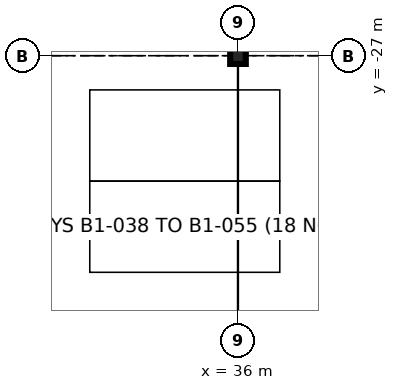
"""IFC4 building model, lengths in metres.
Left out: names, types, materials, properties, quantities, classifications, styles, units other than length and angle.
Written with IfcOpenShell. Run it as: python <this file> out.ifc"""

import sys

from ifc_helpers import new_model, si_unit, direction, frame, origin, origin_2d, place, context, subcontext, project, spatial, i_section, extrude, element, save


model = new_model("IFC4")
c1 = context("Model", 3, precision=1e-05, world=origin(), true_north=direction((0.0, 1.0)))
c2 = subcontext(c1, "Body", "Model", "MODEL_VIEW")
j1 = project(units=[si_unit("LENGTHUNIT", "METRE"), si_unit("PLANEANGLEUNIT", "RADIAN")], contexts=[c1])
p1 = place(None, origin())
s1 = spatial("IfcSite", under=j1, at=p1, CompositionType="ELEMENT")
p2 = place(p1, origin())
s2 = spatial("IfcBuilding", under=s1, at=p2, CompositionType="ELEMENT")
p3 = place(p2, frame((0.0, 0.0, -3.6)))
s3 = spatial("IfcBuildingStorey", under=s2, at=p3, CompositionType="ELEMENT", Elevation=-3.6)
p4 = place(p3, frame((36.0, -27.0, 0.0), z_axis=(0.0, 0.0, 1.0), x_axis=(1.0, 0.0, 0.0)))
e1 = element("IfcColumn", 1, at=p4, inside=s3, PredefinedType="COLUMN", context=c2, shape_type="SweptSolid", body=[
    extrude(i_section(OverallWidth=0.411, OverallDepth=0.434, WebThickness=0.036, FlangeThickness=0.057, at=origin_2d()), origin(), (0.0, 0.0, 1.0), 3.6),
])
save(model, sys.argv[1])
